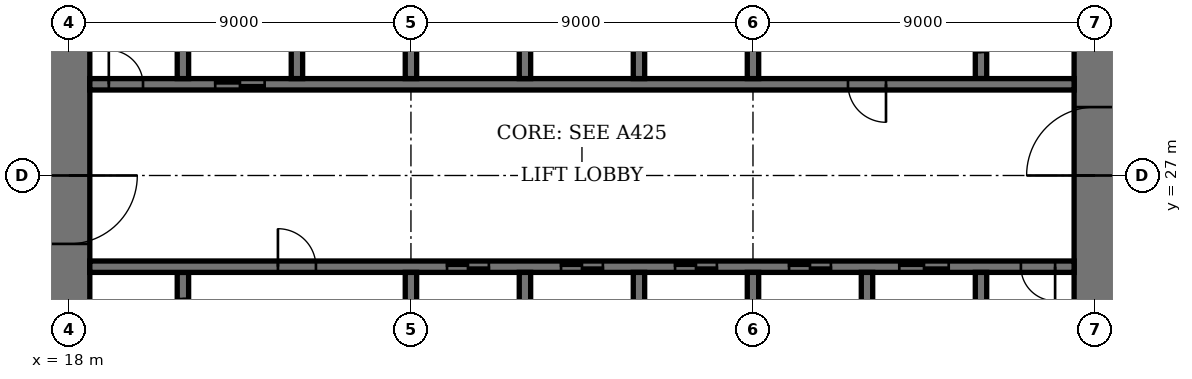
"""IFC4 building model, lengths in metres.
Left out: names, types, materials, properties, quantities, classifications, styles, units other than length and angle.
Written with IfcOpenShell. Run it as: python <this file> out.ifc"""

import sys

from ifc_helpers import new_model, si_unit, direction, frame, frame_2d, origin, place, context, subcontext, project, spatial, rectangle, extrude, element, fill, save


model = new_model("IFC4")
c1 = context("Model", 3, precision=1e-05, world=origin(), true_north=direction((0.0, 1.0)))
c2 = subcontext(c1, "Body", "Model", "MODEL_VIEW")
j1 = project(units=[si_unit("LENGTHUNIT", "METRE"), si_unit("PLANEANGLEUNIT", "RADIAN")], contexts=[c1])
p1 = place(None, origin())
s1 = spatial("IfcSite", under=j1, at=p1, CompositionType="ELEMENT")
p2 = place(p1, origin())
s2 = spatial("IfcBuilding", under=s1, at=p2, CompositionType="ELEMENT")
p3 = place(p2, frame((0.0, 0.0, 43.8)))
s3 = spatial("IfcBuildingStorey", under=s2, at=p3, CompositionType="ELEMENT", Elevation=43.8)
p4 = place(p3, frame((18.0, 35.45, 0.0), z_axis=(0.0, 0.0, 1.0), x_axis=(0.0, -1.0, 0.0)))
e1 = element("IfcWall", 1, at=p4, inside=s3, PredefinedType="SHEAR", context=c2, shape_type="SweptSolid", body=[
    extrude(rectangle(XDim=16.9, YDim=1.1, at=frame_2d((8.45, 0.0))), origin(), (0.0, 0.0, 1.0), 4.0),
])
p5 = place(p4, frame((8.45, 0.0, 0.0)))
e2 = element("IfcOpeningElement", 2, at=p5, cuts=e1, PredefinedType="OPENING", context=c2, shape_type="SweptSolid", body=[
    extrude(rectangle(XDim=1.8, YDim=2.4, at=frame_2d((0.9, 1.2))), frame((0.0, 0.56, 0.0), z_axis=(0.0, -1.0, 0.0), x_axis=(1.0, 0.0, 0.0)), (0.0, 0.0, 1.0), 1.12),
])
p6 = place(p3, frame((45.0, 18.55, 0.0), z_axis=(0.0, 0.0, 1.0), x_axis=(0.0, 1.0, 0.0)))
e3 = element("IfcWall", 3, at=p6, inside=s3, PredefinedType="SHEAR", context=c2, shape_type="SweptSolid", body=[
    extrude(rectangle(XDim=16.9, YDim=1.1, at=frame_2d((8.45, 0.0))), origin(), (0.0, 0.0, 1.0), 4.0),
])
p7 = place(p6, frame((8.45, 0.0, 0.0)))
e4 = element("IfcOpeningElement", 4, at=p7, cuts=e3, PredefinedType="OPENING", context=c2, shape_type="SweptSolid", body=[
    extrude(rectangle(XDim=1.8, YDim=2.4, at=frame_2d((0.9, 1.2))), frame((0.0, 0.56, 0.0), z_axis=(0.0, -1.0, 0.0), x_axis=(1.0, 0.0, 0.0)), (0.0, 0.0, 1.0), 1.12),
])
p8 = place(p3, frame((21.0, 21.95, 0.0), z_axis=(0.0, 0.0, 1.0), x_axis=(0.0, 1.0, 0.0)))
e5 = element("IfcWall", 5, at=p8, inside=s3, PredefinedType="SHEAR", context=c2, shape_type="SweptSolid", body=[
    extrude(rectangle(XDim=2.5, YDim=0.3, at=frame_2d((1.25, 0.0))), origin(), (0.0, 0.0, 1.0), 4.0),
])
p9 = place(p8, frame((0.7, 0.0, 0.0)))
e6 = element("IfcOpeningElement", 6, at=p9, cuts=e5, PredefinedType="OPENING", context=c2, shape_type="SweptSolid", body=[
    extrude(rectangle(XDim=1.1, YDim=2.4, at=frame_2d((0.55, 1.2))), frame((0.0, 0.16, 0.0), z_axis=(0.0, -1.0, 0.0), x_axis=(1.0, 0.0, 0.0)), (0.0, 0.0, 1.0), 0.32),
])
p10 = place(p3, frame((42.0, 29.55, 0.0), z_axis=(0.0, 0.0, 1.0), x_axis=(0.0, 1.0, 0.0)))
e7 = element("IfcWall", 7, at=p10, inside=s3, PredefinedType="SHEAR", context=c2, shape_type="SweptSolid", body=[
    extrude(rectangle(XDim=2.5, YDim=0.3, at=frame_2d((1.25, 0.0))), origin(), (0.0, 0.0, 1.0), 4.0),
])
p11 = place(p10, frame((0.7, 0.0, 0.0)))
e8 = element("IfcOpeningElement", 8, at=p11, cuts=e7, PredefinedType="OPENING", context=c2, shape_type="SweptSolid", body=[
    extrude(rectangle(XDim=1.1, YDim=2.4, at=frame_2d((0.55, 1.2))), frame((0.0, 0.16, 0.0), z_axis=(0.0, -1.0, 0.0), x_axis=(1.0, 0.0, 0.0)), (0.0, 0.0, 1.0), 0.32),
])
p12 = place(p3, frame((18.55, 24.6, 0.0), z_axis=(0.0, 0.0, 1.0), x_axis=(1.0, 0.0, 0.0)))
e9 = element("IfcWall", 9, at=p12, inside=s3, PredefinedType="SHEAR", context=c2, shape_type="SweptSolid", body=[
    extrude(rectangle(XDim=25.9, YDim=0.3, at=frame_2d((12.95, 0.0))), origin(), (0.0, 0.0, 1.0), 4.0),
])
p13 = place(p12, frame((4.95, 0.0, 0.0)))
e10 = element("IfcOpeningElement", 10, at=p13, cuts=e9, PredefinedType="OPENING", context=c2, shape_type="SweptSolid", body=[
    extrude(rectangle(XDim=1.0, YDim=2.4, at=frame_2d((0.5, 1.2))), frame((0.0, 0.16, 0.0), z_axis=(0.0, -1.0, 0.0), x_axis=(1.0, 0.0, 0.0)), (0.0, 0.0, 1.0), 0.32),
])
p14 = place(p12, frame((24.5, 0.0, 0.0)))
e11 = element("IfcOpeningElement", 11, at=p14, cuts=e9, PredefinedType="OPENING", context=c2, shape_type="SweptSolid", body=[
    extrude(rectangle(XDim=0.9, YDim=2.1, at=frame_2d((0.45, 1.05))), frame((0.0, 0.16, 0.0), z_axis=(0.0, -1.0, 0.0), x_axis=(1.0, 0.0, 0.0)), (0.0, 0.0, 1.0), 0.32),
])
p15 = place(p12, frame((9.4, 0.0, 0.0)))
e12 = element("IfcOpeningElement", 12, at=p15, cuts=e9, PredefinedType="OPENING", context=c2, shape_type="SweptSolid", body=[
    extrude(rectangle(XDim=1.1, YDim=2.4, at=frame_2d((0.55, 1.2))), frame((0.0, 0.16, 0.0), z_axis=(0.0, -1.0, 0.0), x_axis=(1.0, 0.0, 0.0)), (0.0, 0.0, 1.0), 0.32),
])
p16 = place(p12, frame((12.4, 0.0, 0.0)))
e13 = element("IfcOpeningElement", 13, at=p16, cuts=e9, PredefinedType="OPENING", context=c2, shape_type="SweptSolid", body=[
    extrude(rectangle(XDim=1.1, YDim=2.4, at=frame_2d((0.55, 1.2))), frame((0.0, 0.16, 0.0), z_axis=(0.0, -1.0, 0.0), x_axis=(1.0, 0.0, 0.0)), (0.0, 0.0, 1.0), 0.32),
])
p17 = place(p12, frame((15.4, 0.0, 0.0)))
e14 = element("IfcOpeningElement", 14, at=p17, cuts=e9, PredefinedType="OPENING", context=c2, shape_type="SweptSolid", body=[
    extrude(rectangle(XDim=1.1, YDim=2.4, at=frame_2d((0.55, 1.2))), frame((0.0, 0.16, 0.0), z_axis=(0.0, -1.0, 0.0), x_axis=(1.0, 0.0, 0.0)), (0.0, 0.0, 1.0), 0.32),
])
p18 = place(p12, frame((18.4, 0.0, 0.0)))
e15 = element("IfcOpeningElement", 15, at=p18, cuts=e9, PredefinedType="OPENING", context=c2, shape_type="SweptSolid", body=[
    extrude(rectangle(XDim=1.1, YDim=2.4, at=frame_2d((0.55, 1.2))), frame((0.0, 0.16, 0.0), z_axis=(0.0, -1.0, 0.0), x_axis=(1.0, 0.0, 0.0)), (0.0, 0.0, 1.0), 0.32),
])
p19 = place(p12, frame((21.3, 0.0, 0.0)))
e16 = element("IfcOpeningElement", 16, at=p19, cuts=e9, PredefinedType="OPENING", context=c2, shape_type="SweptSolid", body=[
    extrude(rectangle(XDim=1.3, YDim=2.4, at=frame_2d((0.65, 1.2))), frame((0.0, 0.16, 0.0), z_axis=(0.0, -1.0, 0.0), x_axis=(1.0, 0.0, 0.0)), (0.0, 0.0, 1.0), 0.32),
])
p20 = place(p3, frame((18.55, 29.4, 0.0), z_axis=(0.0, 0.0, 1.0), x_axis=(1.0, 0.0, 0.0)))
e17 = element("IfcWall", 17, at=p20, inside=s3, PredefinedType="SHEAR", context=c2, shape_type="SweptSolid", body=[
    extrude(rectangle(XDim=25.9, YDim=0.3, at=frame_2d((12.95, 0.0))), origin(), (0.0, 0.0, 1.0), 4.0),
])
p21 = place(p20, frame((19.95, 0.0, 0.0)))
e18 = element("IfcOpeningElement", 18, at=p21, cuts=e17, PredefinedType="OPENING", context=c2, shape_type="SweptSolid", body=[
    extrude(rectangle(XDim=1.0, YDim=2.4, at=frame_2d((0.5, 1.2))), frame((0.0, 0.16, 0.0), z_axis=(0.0, -1.0, 0.0), x_axis=(1.0, 0.0, 0.0)), (0.0, 0.0, 1.0), 0.32),
])
p22 = place(p20, frame((0.5, 0.0, 0.0)))
e19 = element("IfcOpeningElement", 19, at=p22, cuts=e17, PredefinedType="OPENING", context=c2, shape_type="SweptSolid", body=[
    extrude(rectangle(XDim=0.9, YDim=2.1, at=frame_2d((0.45, 1.05))), frame((0.0, 0.16, 0.0), z_axis=(0.0, -1.0, 0.0), x_axis=(1.0, 0.0, 0.0)), (0.0, 0.0, 1.0), 0.32),
])
p23 = place(p20, frame((3.3, 0.0, 0.0)))
e20 = element("IfcOpeningElement", 20, at=p23, cuts=e17, PredefinedType="OPENING", context=c2, shape_type="SweptSolid", body=[
    extrude(rectangle(XDim=1.3, YDim=2.4, at=frame_2d((0.65, 1.2))), frame((0.0, 0.16, 0.0), z_axis=(0.0, -1.0, 0.0), x_axis=(1.0, 0.0, 0.0)), (0.0, 0.0, 1.0), 0.32),
])
for number, where, z_axis, x_axis in (
    (21, (30.0, 21.75, 0.0), (0.0, 0.0, 1.0), (0.0, 1.0, 0.0)),
    (22, (33.0, 29.55, 0.0), (0.0, 0.0, 1.0), (0.0, 1.0, 0.0)),
    (23, (33.0, 21.75, 0.0), (0.0, 0.0, 1.0), (0.0, 1.0, 0.0)),
    (24, (30.0, 29.55, 0.0), (0.0, 0.0, 1.0), (0.0, 1.0, 0.0)),
    (25, (36.0, 21.75, 0.0), (0.0, 0.0, 1.0), (0.0, 1.0, 0.0)),
    (26, (27.0, 29.55, 0.0), (0.0, 0.0, 1.0), (0.0, 1.0, 0.0)),
):
    element("IfcWall", number, at=place(p3, frame(where, z_axis=z_axis, x_axis=x_axis)), inside=s3, PredefinedType="SHEAR", context=c2, shape_type="SweptSolid", body=[
        extrude(rectangle(XDim=2.7, YDim=0.3, at=frame_2d((1.35, 0.0))), origin(), (0.0, 0.0, 1.0), 4.0),
    ])
for number, where, z_axis, x_axis in (
    (27, (39.0, 18.55, 0.0), (0.0, 0.0, 1.0), (0.0, 1.0, 0.0)),
    (28, (24.0, 29.55, 0.0), (0.0, 0.0, 1.0), (0.0, 1.0, 0.0)),
):
    element("IfcWall", number, at=place(p3, frame(where, z_axis=z_axis, x_axis=x_axis)), inside=s3, PredefinedType="SHEAR", context=c2, shape_type="SweptSolid", body=[
        extrude(rectangle(XDim=5.9, YDim=0.3, at=frame_2d((2.95, 0.0))), origin(), (0.0, 0.0, 1.0), 4.0),
    ])
for number, where, z_axis, x_axis in (
    (29, (42.0, 21.75, 0.0), (0.0, 0.0, 1.0), (0.0, 1.0, 0.0)),
    (30, (21.0, 29.55, 0.0), (0.0, 0.0, 1.0), (0.0, 1.0, 0.0)),
):
    element("IfcWall", number, at=place(p3, frame(where, z_axis=z_axis, x_axis=x_axis)), inside=s3, PredefinedType="SHEAR", context=c2, shape_type="SweptSolid", body=[
        extrude(rectangle(XDim=2.7, YDim=0.3, at=frame_2d((1.35, 0.0))), origin(), (0.0, 0.0, 1.0), 4.0),
    ])
for number, where, z_axis, x_axis in (
    (31, (27.0, 21.6, 0.0), (0.0, 0.0, 1.0), (0.0, 1.0, 0.0)),
    (32, (36.0, 29.55, 0.0), (0.0, 0.0, 1.0), (0.0, 1.0, 0.0)),
):
    element("IfcWall", number, at=place(p3, frame(where, z_axis=z_axis, x_axis=x_axis)), inside=s3, PredefinedType="SHEAR", context=c2, shape_type="SweptSolid", body=[
        extrude(rectangle(XDim=2.85, YDim=0.3, at=frame_2d((1.425, 0.0))), origin(), (0.0, 0.0, 1.0), 4.0),
    ])
p24 = place(p5, origin())
e33 = element("IfcDoor", 33, at=p24, inside=s3, OperationType="DOUBLE_DOOR_DOUBLE_SWING", PredefinedType="DOOR", context=c2, shape_type="SweptSolid", body=[
    extrude(rectangle(XDim=1.8, YDim=2.4, at=frame_2d((0.9, 1.2))), frame((0.0, 0.03, 0.0), z_axis=(0.0, -1.0, 0.0), x_axis=(1.0, 0.0, 0.0)), (0.0, 0.0, 1.0), 0.06),
    extrude(rectangle(XDim=0.04, YDim=2.4, at=frame_2d((0.02, 1.2))), frame((0.0, 0.55, 0.0), z_axis=(0.0, -1.0, 0.0), x_axis=(1.0, 0.0, 0.0)), (0.0, 0.0, 1.0), 1.1),
    extrude(rectangle(XDim=0.04, YDim=2.4, at=frame_2d((1.78, 1.2))), frame((0.0, 0.55, 0.0), z_axis=(0.0, -1.0, 0.0), x_axis=(1.0, 0.0, 0.0)), (0.0, 0.0, 1.0), 1.1),
    extrude(rectangle(XDim=1.8, YDim=0.04, at=frame_2d((0.9, 2.38))), frame((0.0, 0.55, 0.0), z_axis=(0.0, -1.0, 0.0), x_axis=(1.0, 0.0, 0.0)), (0.0, 0.0, 1.0), 1.1),
])
fill(e2, e33)
p25 = place(p7, origin())
e34 = element("IfcDoor", 34, at=p25, inside=s3, OperationType="DOUBLE_DOOR_DOUBLE_SWING", PredefinedType="DOOR", context=c2, shape_type="SweptSolid", body=[
    extrude(rectangle(XDim=1.8, YDim=2.4, at=frame_2d((0.9, 1.2))), frame((0.0, 0.03, 0.0), z_axis=(0.0, -1.0, 0.0), x_axis=(1.0, 0.0, 0.0)), (0.0, 0.0, 1.0), 0.06),
    extrude(rectangle(XDim=0.04, YDim=2.4, at=frame_2d((0.02, 1.2))), frame((0.0, 0.55, 0.0), z_axis=(0.0, -1.0, 0.0), x_axis=(1.0, 0.0, 0.0)), (0.0, 0.0, 1.0), 1.1),
    extrude(rectangle(XDim=0.04, YDim=2.4, at=frame_2d((1.78, 1.2))), frame((0.0, 0.55, 0.0), z_axis=(0.0, -1.0, 0.0), x_axis=(1.0, 0.0, 0.0)), (0.0, 0.0, 1.0), 1.1),
    extrude(rectangle(XDim=1.8, YDim=0.04, at=frame_2d((0.9, 2.38))), frame((0.0, 0.55, 0.0), z_axis=(0.0, -1.0, 0.0), x_axis=(1.0, 0.0, 0.0)), (0.0, 0.0, 1.0), 1.1),
])
fill(e4, e34)
p26 = place(p13, origin())
e35 = element("IfcDoor", 35, at=p26, inside=s3, OperationType="SINGLE_SWING_RIGHT", PredefinedType="DOOR", context=c2, shape_type="SweptSolid", body=[
    extrude(rectangle(XDim=1.0, YDim=2.4, at=frame_2d((0.5, 1.2))), frame((0.0, 0.03, 0.0), z_axis=(0.0, -1.0, 0.0), x_axis=(1.0, 0.0, 0.0)), (0.0, 0.0, 1.0), 0.06),
])
fill(e10, e35)
p27 = place(p21, origin())
e36 = element("IfcDoor", 36, at=p27, inside=s3, OperationType="SINGLE_SWING_RIGHT", PredefinedType="DOOR", context=c2, shape_type="SweptSolid", body=[
    extrude(rectangle(XDim=1.0, YDim=2.4, at=frame_2d((0.5, 1.2))), frame((0.0, 0.03, 0.0), z_axis=(0.0, -1.0, 0.0), x_axis=(1.0, 0.0, 0.0)), (0.0, 0.0, 1.0), 0.06),
])
fill(e18, e36)
p28 = place(p14, origin())
e37 = element("IfcDoor", 37, at=p28, inside=s3, OperationType="SINGLE_SWING_RIGHT", PredefinedType="DOOR", context=c2, shape_type="SweptSolid", body=[
    extrude(rectangle(XDim=0.9, YDim=2.1, at=frame_2d((0.45, 1.05))), frame((0.0, 0.03, 0.0), z_axis=(0.0, -1.0, 0.0), x_axis=(1.0, 0.0, 0.0)), (0.0, 0.0, 1.0), 0.06),
])
fill(e11, e37)
p29 = place(p22, origin())
e38 = element("IfcDoor", 38, at=p29, inside=s3, OperationType="SINGLE_SWING_RIGHT", PredefinedType="DOOR", context=c2, shape_type="SweptSolid", body=[
    extrude(rectangle(XDim=0.9, YDim=2.1, at=frame_2d((0.45, 1.05))), frame((0.0, 0.03, 0.0), z_axis=(0.0, -1.0, 0.0), x_axis=(1.0, 0.0, 0.0)), (0.0, 0.0, 1.0), 0.06),
])
fill(e19, e38)
p30 = place(p15, origin())
e39 = element("IfcDoor", 39, at=p30, inside=s3, OperationType="DOUBLE_DOOR_SLIDING", PredefinedType="DOOR", context=c2, shape_type="SweptSolid", body=[
    extrude(rectangle(XDim=1.1, YDim=2.4, at=frame_2d((0.55, 1.2))), frame((0.0, 0.02, 0.0), z_axis=(0.0, -1.0, 0.0), x_axis=(1.0, 0.0, 0.0)), (0.0, 0.0, 1.0), 0.04),
])
fill(e12, e39)
p31 = place(p16, origin())
e40 = element("IfcDoor", 40, at=p31, inside=s3, OperationType="DOUBLE_DOOR_SLIDING", PredefinedType="DOOR", context=c2, shape_type="SweptSolid", body=[
    extrude(rectangle(XDim=1.1, YDim=2.4, at=frame_2d((0.55, 1.2))), frame((0.0, 0.02, 0.0), z_axis=(0.0, -1.0, 0.0), x_axis=(1.0, 0.0, 0.0)), (0.0, 0.0, 1.0), 0.04),
])
fill(e13, e40)
p32 = place(p17, origin())
e41 = element("IfcDoor", 41, at=p32, inside=s3, OperationType="DOUBLE_DOOR_SLIDING", PredefinedType="DOOR", context=c2, shape_type="SweptSolid", body=[
    extrude(rectangle(XDim=1.1, YDim=2.4, at=frame_2d((0.55, 1.2))), frame((0.0, 0.02, 0.0), z_axis=(0.0, -1.0, 0.0), x_axis=(1.0, 0.0, 0.0)), (0.0, 0.0, 1.0), 0.04),
])
fill(e14, e41)
p33 = place(p18, origin())
e42 = element("IfcDoor", 42, at=p33, inside=s3, OperationType="DOUBLE_DOOR_SLIDING", PredefinedType="DOOR", context=c2, shape_type="SweptSolid", body=[
    extrude(rectangle(XDim=1.1, YDim=2.4, at=frame_2d((0.55, 1.2))), frame((0.0, 0.02, 0.0), z_axis=(0.0, -1.0, 0.0), x_axis=(1.0, 0.0, 0.0)), (0.0, 0.0, 1.0), 0.04),
])
fill(e15, e42)
p34 = place(p19, origin())
e43 = element("IfcDoor", 43, at=p34, inside=s3, OperationType="DOUBLE_DOOR_SLIDING", PredefinedType="DOOR", context=c2, shape_type="SweptSolid", body=[
    extrude(rectangle(XDim=1.3, YDim=2.4, at=frame_2d((0.65, 1.2))), frame((0.0, 0.02, 0.0), z_axis=(0.0, -1.0, 0.0), x_axis=(1.0, 0.0, 0.0)), (0.0, 0.0, 1.0), 0.04),
])
fill(e16, e43)
p35 = place(p23, origin())
e44 = element("IfcDoor", 44, at=p35, inside=s3, OperationType="DOUBLE_DOOR_SLIDING", PredefinedType="DOOR", context=c2, shape_type="SweptSolid", body=[
    extrude(rectangle(XDim=1.3, YDim=2.4, at=frame_2d((0.65, 1.2))), frame((0.0, 0.02, 0.0), z_axis=(0.0, -1.0, 0.0), x_axis=(1.0, 0.0, 0.0)), (0.0, 0.0, 1.0), 0.04),
])
fill(e20, e44)
save(model, sys.argv[1])
